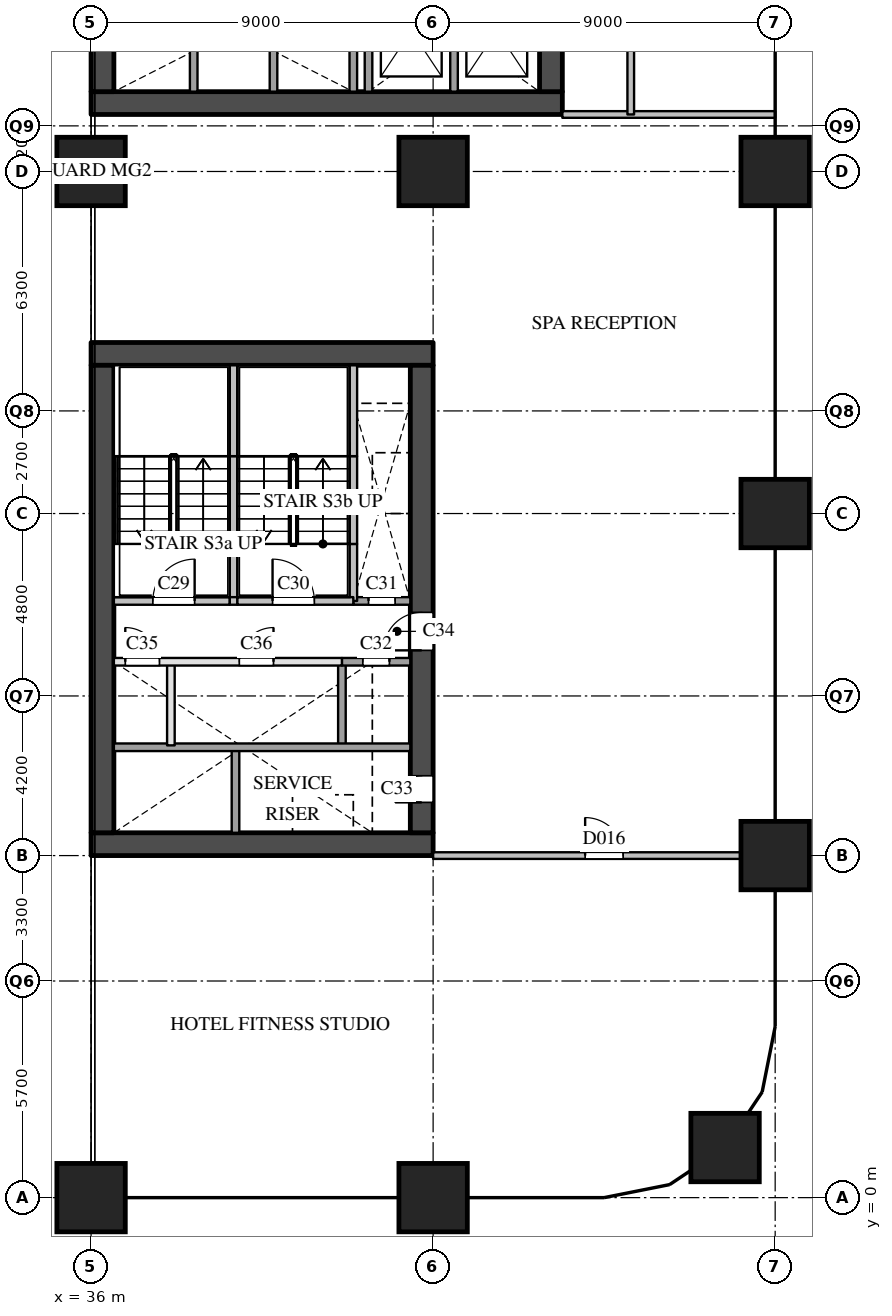
"""IFC4 building model, lengths in metres.
Left out: names, types, materials, properties, quantities, classifications, styles, units other than length and angle.
Written with IfcOpenShell. Run it as: python <this file> out.ifc"""

import sys

from ifc_helpers import new_model, si_unit, direction, frame, frame_2d, origin, origin_2d, place, context, subcontext, project, spatial, rectangle, extrude, element, fill, save


model = new_model("IFC4")
c1 = context("Model", 3, precision=1e-05, world=origin(), true_north=direction((0.0, 1.0)))
c2 = subcontext(c1, "Body", "Model", "MODEL_VIEW")
j1 = project(units=[si_unit("LENGTHUNIT", "METRE"), si_unit("PLANEANGLEUNIT", "RADIAN")], contexts=[c1])
p1 = place(None, origin())
s1 = spatial("IfcSite", under=j1, at=p1, CompositionType="ELEMENT")
p2 = place(p1, origin())
s2 = spatial("IfcBuilding", under=s1, at=p2, CompositionType="ELEMENT")
p3 = place(p2, frame((0.0, 0.0, 21.0)))
s3 = spatial("IfcBuildingStorey", under=s2, at=p3, CompositionType="ELEMENT", Elevation=21.0)
for number, where, z_axis, x_axis in (
    (1, (36.0, 0.0, 0.0), (0.0, 0.0, 1.0), (1.0, 0.0, 0.0)),
    (2, (36.0, 27.0, 0.0), (0.0, 0.0, 1.0), (1.0, 0.0, 0.0)),
    (3, (45.0, 0.0, 0.0), (0.0, 0.0, 1.0), (1.0, 0.0, 0.0)),
    (4, (45.0, 27.0, 0.0), (0.0, 0.0, 1.0), (1.0, 0.0, 0.0)),
    (5, (52.682, 1.318, 0.0), (0.0, 0.0, 1.0), (1.0, 0.0, 0.0)),
    (6, (54.0, 9.0, 0.0), (0.0, 0.0, 1.0), (1.0, 0.0, 0.0)),
    (7, (54.0, 18.0, 0.0), (0.0, 0.0, 1.0), (1.0, 0.0, 0.0)),
    (8, (54.0, 27.0, 0.0), (0.0, 0.0, 1.0), (1.0, 0.0, 0.0)),
):
    element("IfcColumn", number, at=place(p3, frame(where, z_axis=z_axis, x_axis=x_axis)), inside=s3, PredefinedType="COLUMN", context=c2, shape_type="SweptSolid", body=[
        extrude(rectangle(XDim=1.8, YDim=1.8, at=origin_2d()), origin(), (0.0, 0.0, 1.0), 5.0),
    ])
p4 = place(p3, frame((36.0, 28.8, 0.0), z_axis=(0.0, 0.0, 1.0), x_axis=(1.0, 0.0, 0.0)))
e9 = element("IfcWall", 9, at=p4, inside=s3, PredefinedType="SHEAR", context=c2, shape_type="SweptSolid", body=[
    extrude(rectangle(XDim=12.4, YDim=0.6, at=frame_2d((6.2, 0.0))), origin(), (0.0, 0.0, 1.0), 4.55),
])
p5 = place(p3, frame((36.3, 29.1, 0.0), z_axis=(0.0, 0.0, 1.0), x_axis=(0.0, 1.0, 0.0)))
e10 = element("IfcWall", 10, at=p5, inside=s3, PredefinedType="SHEAR", context=c2, shape_type="SweptSolid", body=[
    extrude(rectangle(XDim=20.3, YDim=0.6, at=frame_2d((10.15, 0.0))), origin(), (0.0, 0.0, 1.0), 4.55),
])
p6 = place(p3, frame((48.1, 29.1, 0.0), z_axis=(0.0, 0.0, 1.0), x_axis=(0.0, 1.0, 0.0)))
e11 = element("IfcWall", 11, at=p6, inside=s3, PredefinedType="SHEAR", context=c2, shape_type="SweptSolid", body=[
    extrude(rectangle(XDim=20.3, YDim=0.6, at=frame_2d((10.15, 0.0))), origin(), (0.0, 0.0, 1.0), 4.55),
])
p7 = place(p6, frame((12.5, 0.0, 0.0)))
e12 = element("IfcOpeningElement", 12, at=p7, cuts=e11, PredefinedType="OPENING", context=c2, shape_type="SweptSolid", body=[
    extrude(rectangle(XDim=0.7, YDim=2.1, at=frame_2d((0.35, 1.05))), frame((0.0, 0.31, 0.0), z_axis=(0.0, -1.0, 0.0), x_axis=(1.0, 0.0, 0.0)), (0.0, 0.0, 1.0), 0.62),
])
p8 = place(p6, frame((3.9, 0.0, 0.0)))
e13 = element("IfcOpeningElement", 13, at=p8, cuts=e11, PredefinedType="OPENING", context=c2, shape_type="SweptSolid", body=[
    extrude(rectangle(XDim=1.8, YDim=2.1, at=frame_2d((0.9, 1.05))), frame((0.0, 0.31, 0.0), z_axis=(0.0, -1.0, 0.0), x_axis=(1.0, 0.0, 0.0)), (0.0, 0.0, 1.0), 0.62),
])
p9 = place(p6, frame((16.4, 0.0, 0.0)))
e14 = element("IfcOpeningElement", 14, at=p9, cuts=e11, PredefinedType="OPENING", context=c2, shape_type="SweptSolid", body=[
    extrude(rectangle(XDim=1.0, YDim=2.1, at=frame_2d((0.5, 1.05))), frame((0.0, 0.31, 0.0), z_axis=(0.0, -1.0, 0.0), x_axis=(1.0, 0.0, 0.0)), (0.0, 0.0, 1.0), 0.62),
])
for number, where, z_axis, x_axis in (
    (15, (38.7, 29.1, 0.0), (0.0, 0.0, 1.0), (0.0, 1.0, 0.0)),
    (16, (40.8, 29.1, 0.0), (0.0, 0.0, 1.0), (0.0, 1.0, 0.0)),
    (17, (42.9, 29.1, 0.0), (0.0, 0.0, 1.0), (0.0, 1.0, 0.0)),
):
    element("IfcWall", number, at=place(p3, frame(where, z_axis=z_axis, x_axis=x_axis)), inside=s3, PredefinedType="SOLIDWALL", context=c2, shape_type="SweptSolid", body=[
        extrude(rectangle(XDim=3.2, YDim=0.2, at=frame_2d((1.6, 0.0))), origin(), (0.0, 0.0, 1.0), 4.55),
    ])
p10 = place(p3, frame((43.3, 29.1, 0.0), z_axis=(0.0, 0.0, 1.0), x_axis=(0.0, 1.0, 0.0)))
e18 = element("IfcWall", 18, at=p10, inside=s3, PredefinedType="SOLIDWALL", context=c2, shape_type="SweptSolid", body=[
    extrude(rectangle(XDim=9.9, YDim=0.2, at=frame_2d((4.95, 0.0))), origin(), (0.0, 0.0, 1.0), 4.55),
])
p11 = place(p10, frame((3.6, 0.0, 0.0)))
e19 = element("IfcOpeningElement", 19, at=p11, cuts=e18, PredefinedType="OPENING", context=c2, shape_type="SweptSolid", body=[
    extrude(rectangle(XDim=1.8, YDim=2.1, at=frame_2d((0.9, 1.05))), frame((0.0, 0.11, 0.0), z_axis=(0.0, -1.0, 0.0), x_axis=(1.0, 0.0, 0.0)), (0.0, 0.0, 1.0), 0.22),
])
p12 = place(p3, frame((45.55, 29.1, 0.0), z_axis=(0.0, 0.0, 1.0), x_axis=(0.0, 1.0, 0.0)))
e20 = element("IfcWall", 20, at=p12, inside=s3, PredefinedType="SOLIDWALL", context=c2, shape_type="SweptSolid", body=[
    extrude(rectangle(XDim=3.2, YDim=0.2, at=frame_2d((1.6, 0.0))), origin(), (0.0, 0.0, 1.0), 4.55),
])
for number, where, z_axis, x_axis in (
    (21, (36.0, 9.3, 0.0), (0.0, 0.0, 1.0), (1.0, 0.0, 0.0)),
    (22, (36.0, 22.2, 0.0), (0.0, 0.0, 1.0), (1.0, 0.0, 0.0)),
):
    element("IfcWall", number, at=place(p3, frame(where, z_axis=z_axis, x_axis=x_axis)), inside=s3, PredefinedType="SHEAR", context=c2, shape_type="SweptSolid", body=[
        extrude(rectangle(XDim=9.0, YDim=0.6, at=frame_2d((4.5, 0.0))), origin(), (0.0, 0.0, 1.0), 4.55),
    ])
p13 = place(p3, frame((36.3, 9.6, 0.0), z_axis=(0.0, 0.0, 1.0), x_axis=(0.0, 1.0, 0.0)))
e23 = element("IfcWall", 23, at=p13, inside=s3, PredefinedType="SHEAR", context=c2, shape_type="SweptSolid", body=[
    extrude(rectangle(XDim=12.3, YDim=0.6, at=frame_2d((6.15, 0.0))), origin(), (0.0, 0.0, 1.0), 4.55),
])
p14 = place(p3, frame((44.7, 9.6, 0.0), z_axis=(0.0, 0.0, 1.0), x_axis=(0.0, 1.0, 0.0)))
e24 = element("IfcWall", 24, at=p14, inside=s3, PredefinedType="SHEAR", context=c2, shape_type="SweptSolid", body=[
    extrude(rectangle(XDim=12.3, YDim=0.6, at=frame_2d((6.15, 0.0))), origin(), (0.0, 0.0, 1.0), 4.55),
])
p15 = place(p14, frame((0.8, 0.0, 0.0)))
e25 = element("IfcOpeningElement", 25, at=p15, cuts=e24, PredefinedType="OPENING", context=c2, shape_type="SweptSolid", body=[
    extrude(rectangle(XDim=0.7, YDim=2.1, at=frame_2d((0.35, 1.05))), frame((0.0, 0.31, 0.0), z_axis=(0.0, -1.0, 0.0), x_axis=(1.0, 0.0, 0.0)), (0.0, 0.0, 1.0), 0.62),
])
p16 = place(p14, frame((4.8, 0.0, 0.0)))
e26 = element("IfcOpeningElement", 26, at=p16, cuts=e24, PredefinedType="OPENING", context=c2, shape_type="SweptSolid", body=[
    extrude(rectangle(XDim=1.0, YDim=2.1, at=frame_2d((0.5, 1.05))), frame((0.0, 0.31, 0.0), z_axis=(0.0, -1.0, 0.0), x_axis=(1.0, 0.0, 0.0)), (0.0, 0.0, 1.0), 0.62),
])
p17 = place(p3, frame((38.1, 11.9, 0.0), z_axis=(0.0, 0.0, 1.0), x_axis=(0.0, 1.0, 0.0)))
e27 = element("IfcWall", 27, at=p17, inside=s3, PredefinedType="PARTITIONING", context=c2, shape_type="SweptSolid", body=[
    extrude(rectangle(XDim=2.2, YDim=0.2, at=frame_2d((1.1, 0.0))), origin(), (0.0, 0.0, 1.0), 4.55),
])
p18 = place(p3, frame((39.75, 15.7, 0.0), z_axis=(0.0, 0.0, 1.0), x_axis=(0.0, 1.0, 0.0)))
e28 = element("IfcWall", 28, at=p18, inside=s3, PredefinedType="SOLIDWALL", context=c2, shape_type="SweptSolid", body=[
    extrude(rectangle(XDim=1.5, YDim=0.2, at=frame_2d((0.75, 0.0))), origin(), (0.0, 0.0, 1.0), 4.55),
])
p19 = place(p3, frame((39.75, 17.2, 0.0), z_axis=(0.0, 0.0, 1.0), x_axis=(0.0, 1.0, 0.0)))
e29 = element("IfcWall", 29, at=p19, inside=s3, PredefinedType="SOLIDWALL", context=c2, shape_type="SweptSolid", body=[
    extrude(rectangle(XDim=2.31, YDim=0.2, at=frame_2d((1.155, 0.0))), origin(), (0.0, 0.0, 1.0), 4.55),
])
p20 = place(p3, frame((39.75, 19.51, 0.0), z_axis=(0.0, 0.0, 1.0), x_axis=(0.0, 1.0, 0.0)))
e30 = element("IfcWall", 30, at=p20, inside=s3, PredefinedType="SOLIDWALL", context=c2, shape_type="SweptSolid", body=[
    extrude(rectangle(XDim=2.39, YDim=0.2, at=frame_2d((1.195, 0.0))), origin(), (0.0, 0.0, 1.0), 4.55),
])
p21 = place(p3, frame((39.8, 9.6, 0.0), z_axis=(0.0, 0.0, 1.0), x_axis=(0.0, 1.0, 0.0)))
e31 = element("IfcWall", 31, at=p21, inside=s3, PredefinedType="SOLIDWALL", context=c2, shape_type="SweptSolid", body=[
    extrude(rectangle(XDim=2.3, YDim=0.2, at=frame_2d((1.15, 0.0))), origin(), (0.0, 0.0, 1.0), 4.55),
])
p22 = place(p3, frame((42.6, 11.9, 0.0), z_axis=(0.0, 0.0, 1.0), x_axis=(0.0, 1.0, 0.0)))
e32 = element("IfcWall", 32, at=p22, inside=s3, PredefinedType="SOLIDWALL", context=c2, shape_type="SweptSolid", body=[
    extrude(rectangle(XDim=2.2, YDim=0.2, at=frame_2d((1.1, 0.0))), origin(), (0.0, 0.0, 1.0), 4.55),
])
p23 = place(p3, frame((42.9, 15.7, 0.0), z_axis=(0.0, 0.0, 1.0), x_axis=(0.0, 1.0, 0.0)))
e33 = element("IfcWall", 33, at=p23, inside=s3, PredefinedType="SOLIDWALL", context=c2, shape_type="SweptSolid", body=[
    extrude(rectangle(XDim=1.5, YDim=0.2, at=frame_2d((0.75, 0.0))), origin(), (0.0, 0.0, 1.0), 4.55),
])
p24 = place(p3, frame((42.9, 17.2, 0.0), z_axis=(0.0, 0.0, 1.0), x_axis=(0.0, 1.0, 0.0)))
e34 = element("IfcWall", 34, at=p24, inside=s3, PredefinedType="SOLIDWALL", context=c2, shape_type="SweptSolid", body=[
    extrude(rectangle(XDim=2.31, YDim=0.2, at=frame_2d((1.155, 0.0))), origin(), (0.0, 0.0, 1.0), 4.55),
])
p25 = place(p3, frame((42.9, 19.51, 0.0), z_axis=(0.0, 0.0, 1.0), x_axis=(0.0, 1.0, 0.0)))
e35 = element("IfcWall", 35, at=p25, inside=s3, PredefinedType="SOLIDWALL", context=c2, shape_type="SweptSolid", body=[
    extrude(rectangle(XDim=2.39, YDim=0.2, at=frame_2d((1.195, 0.0))), origin(), (0.0, 0.0, 1.0), 4.55),
])
p26 = place(p3, frame((36.6, 11.85, 0.0), z_axis=(0.0, 0.0, 1.0), x_axis=(1.0, 0.0, 0.0)))
e36 = element("IfcWall", 36, at=p26, inside=s3, PredefinedType="SOLIDWALL", context=c2, shape_type="SweptSolid", body=[
    extrude(rectangle(XDim=7.8, YDim=0.2, at=frame_2d((3.9, 0.0))), origin(), (0.0, 0.0, 1.0), 4.55),
])
p27 = place(p3, frame((36.6, 14.1, 0.0), z_axis=(0.0, 0.0, 1.0), x_axis=(1.0, 0.0, 0.0)))
e37 = element("IfcWall", 37, at=p27, inside=s3, PredefinedType="PARTITIONING", context=c2, shape_type="SweptSolid", body=[
    extrude(rectangle(XDim=6.0, YDim=0.2, at=frame_2d((3.0, 0.0))), origin(), (0.0, 0.0, 1.0), 4.55),
])
p28 = place(p27, frame((0.3, 0.0, 0.0)))
e38 = element("IfcOpeningElement", 38, at=p28, cuts=e37, PredefinedType="OPENING", context=c2, shape_type="SweptSolid", body=[
    extrude(rectangle(XDim=0.9, YDim=2.1, at=frame_2d((0.45, 1.05))), frame((0.0, 0.11, 0.0), z_axis=(0.0, -1.0, 0.0), x_axis=(1.0, 0.0, 0.0)), (0.0, 0.0, 1.0), 0.22),
])
p29 = place(p27, frame((3.3, 0.0, 0.0)))
e39 = element("IfcOpeningElement", 39, at=p29, cuts=e37, PredefinedType="OPENING", context=c2, shape_type="SweptSolid", body=[
    extrude(rectangle(XDim=0.9, YDim=2.1, at=frame_2d((0.45, 1.05))), frame((0.0, 0.11, 0.0), z_axis=(0.0, -1.0, 0.0), x_axis=(1.0, 0.0, 0.0)), (0.0, 0.0, 1.0), 0.22),
])
p30 = place(p3, frame((42.6, 14.1, 0.0), z_axis=(0.0, 0.0, 1.0), x_axis=(1.0, 0.0, 0.0)))
e40 = element("IfcWall", 40, at=p30, inside=s3, PredefinedType="SOLIDWALL", context=c2, shape_type="SweptSolid", body=[
    extrude(rectangle(XDim=1.8, YDim=0.2, at=frame_2d((0.9, 0.0))), origin(), (0.0, 0.0, 1.0), 4.55),
])
p31 = place(p30, frame((0.55, 0.0, 0.0)))
e41 = element("IfcOpeningElement", 41, at=p31, cuts=e40, PredefinedType="OPENING", context=c2, shape_type="SweptSolid", body=[
    extrude(rectangle(XDim=0.7, YDim=2.1, at=frame_2d((0.35, 1.05))), frame((0.0, 0.11, 0.0), z_axis=(0.0, -1.0, 0.0), x_axis=(1.0, 0.0, 0.0)), (0.0, 0.0, 1.0), 0.22),
])
p32 = place(p3, frame((42.9, 15.7, 0.0), z_axis=(0.0, 0.0, 1.0), x_axis=(1.0, 0.0, 0.0)))
e42 = element("IfcWall", 42, at=p32, inside=s3, PredefinedType="SOLIDWALL", context=c2, shape_type="SweptSolid", body=[
    extrude(rectangle(XDim=1.5, YDim=0.2, at=frame_2d((0.75, 0.0))), origin(), (0.0, 0.0, 1.0), 4.55),
])
p33 = place(p32, frame((0.4, 0.0, 0.0)))
e43 = element("IfcOpeningElement", 43, at=p33, cuts=e42, PredefinedType="OPENING", context=c2, shape_type="SweptSolid", body=[
    extrude(rectangle(XDim=0.7, YDim=2.1, at=frame_2d((0.35, 1.05))), frame((0.0, 0.11, 0.0), z_axis=(0.0, -1.0, 0.0), x_axis=(1.0, 0.0, 0.0)), (0.0, 0.0, 1.0), 0.22),
])
p34 = place(p3, frame((36.6, 15.7, 0.0), z_axis=(0.0, 0.0, 1.0), x_axis=(1.0, 0.0, 0.0)))
e44 = element("IfcWall", 44, at=p34, inside=s3, PredefinedType="SOLIDWALL", context=c2, shape_type="SweptSolid", body=[
    extrude(rectangle(XDim=3.05, YDim=0.2, at=frame_2d((1.525, 0.0))), origin(), (0.0, 0.0, 1.0), 4.55),
])
p35 = place(p34, frame((1.025, 0.0, 0.0)))
e45 = element("IfcOpeningElement", 45, at=p35, cuts=e44, PredefinedType="OPENING", context=c2, shape_type="SweptSolid", body=[
    extrude(rectangle(XDim=1.1, YDim=2.1, at=frame_2d((0.55, 1.05))), frame((0.0, 0.11, 0.0), z_axis=(0.0, -1.0, 0.0), x_axis=(1.0, 0.0, 0.0)), (0.0, 0.0, 1.0), 0.22),
])
p36 = place(p3, frame((39.65, 15.7, 0.0), z_axis=(0.0, 0.0, 1.0), x_axis=(1.0, 0.0, 0.0)))
e46 = element("IfcWall", 46, at=p36, inside=s3, PredefinedType="SOLIDWALL", context=c2, shape_type="SweptSolid", body=[
    extrude(rectangle(XDim=0.2, YDim=0.2, at=frame_2d((0.1, 0.0))), origin(), (0.0, 0.0, 1.0), 4.55),
])
p37 = place(p3, frame((39.85, 15.7, 0.0), z_axis=(0.0, 0.0, 1.0), x_axis=(1.0, 0.0, 0.0)))
e47 = element("IfcWall", 47, at=p37, inside=s3, PredefinedType="SOLIDWALL", context=c2, shape_type="SweptSolid", body=[
    extrude(rectangle(XDim=3.05, YDim=0.2, at=frame_2d((1.525, 0.0))), origin(), (0.0, 0.0, 1.0), 4.55),
])
p38 = place(p37, frame((0.925, 0.0, 0.0)))
e48 = element("IfcOpeningElement", 48, at=p38, cuts=e47, PredefinedType="OPENING", context=c2, shape_type="SweptSolid", body=[
    extrude(rectangle(XDim=1.1, YDim=2.1, at=frame_2d((0.55, 1.05))), frame((0.0, 0.11, 0.0), z_axis=(0.0, -1.0, 0.0), x_axis=(1.0, 0.0, 0.0)), (0.0, 0.0, 1.0), 0.22),
])
p39 = place(p3, frame((45.0, 9.0, 0.0), z_axis=(0.0, 0.0, 1.0), x_axis=(1.0, 0.0, 0.0)))
e49 = element("IfcWall", 49, at=p39, inside=s3, PredefinedType="PARTITIONING", context=c2, shape_type="SweptSolid", body=[
    extrude(rectangle(XDim=9.0, YDim=0.175, at=frame_2d((4.5, 0.0))), origin(), (0.0, 0.0, 1.0), 4.55),
])
p40 = place(p39, frame((4.0, 0.0, 0.0)))
e50 = element("IfcOpeningElement", 50, at=p40, cuts=e49, PredefinedType="OPENING", context=c2, shape_type="SweptSolid", body=[
    extrude(rectangle(XDim=1.0, YDim=2.1, at=frame_2d((0.5, 1.05))), frame((0.0, 0.097, 0.0), z_axis=(0.0, -1.0, 0.0), x_axis=(1.0, 0.0, 0.0)), (0.0, 0.0, 1.0), 0.195),
])
p41 = place(p3, frame((48.4, 28.5, 0.0), z_axis=(0.0, 0.0, 1.0), x_axis=(1.0, 0.0, 0.0)))
e51 = element("IfcWall", 51, at=p41, inside=s3, PredefinedType="PARTITIONING", context=c2, shape_type="SweptSolid", body=[
    extrude(rectangle(XDim=5.6, YDim=0.175, at=frame_2d((2.8, 0.0))), origin(), (0.0, 0.0, 1.0), 3.55),
])
p42 = place(p3, frame((50.2, 28.5, 0.0), z_axis=(0.0, 0.0, 1.0), x_axis=(0.0, 1.0, 0.0)))
e52 = element("IfcWall", 52, at=p42, inside=s3, PredefinedType="PARTITIONING", context=c2, shape_type="SweptSolid", body=[
    extrude(rectangle(XDim=21.5, YDim=0.175, at=frame_2d((10.75, 0.0))), origin(), (0.0, 0.0, 1.0), 4.55),
])
p43 = place(p42, frame((5.25, 0.0, 0.0)))
e53 = element("IfcOpeningElement", 53, at=p43, cuts=e52, PredefinedType="OPENING", context=c2, shape_type="SweptSolid", body=[
    extrude(rectangle(XDim=1.0, YDim=2.1, at=frame_2d((0.5, 1.05))), frame((0.0, 0.097, 0.0), z_axis=(0.0, -1.0, 0.0), x_axis=(1.0, 0.0, 0.0)), (0.0, 0.0, 1.0), 0.195),
])
p44 = place(p42, frame((16.0, 0.0, 0.0)))
e54 = element("IfcOpeningElement", 54, at=p44, cuts=e52, PredefinedType="OPENING", context=c2, shape_type="SweptSolid", body=[
    extrude(rectangle(XDim=1.0, YDim=2.1, at=frame_2d((0.5, 1.05))), frame((0.0, 0.097, 0.0), z_axis=(0.0, -1.0, 0.0), x_axis=(1.0, 0.0, 0.0)), (0.0, 0.0, 1.0), 0.195),
])
p45 = place(p35, origin())
e55 = element("IfcDoor", 55, at=p45, inside=s3, OperationType="SINGLE_SWING_RIGHT", PredefinedType="DOOR", context=c2, shape_type="SweptSolid", body=[
    extrude(rectangle(XDim=1.1, YDim=2.1, at=frame_2d((0.55, 1.05))), frame((0.0, 0.025, 0.0), z_axis=(0.0, -1.0, 0.0), x_axis=(1.0, 0.0, 0.0)), (0.0, 0.0, 1.0), 0.05),
])
fill(e45, e55)
p46 = place(p38, origin())
e56 = element("IfcDoor", 56, at=p46, inside=s3, OperationType="SINGLE_SWING_LEFT", PredefinedType="DOOR", context=c2, shape_type="SweptSolid", body=[
    extrude(rectangle(XDim=1.1, YDim=2.1, at=frame_2d((0.55, 1.05))), frame((0.0, 0.025, 0.0), z_axis=(0.0, -1.0, 0.0), x_axis=(1.0, 0.0, 0.0)), (0.0, 0.0, 1.0), 0.05),
])
fill(e48, e56)
p47 = place(p33, origin())
e57 = element("IfcDoor", 57, at=p47, inside=s3, OperationType="SINGLE_SWING_LEFT", PredefinedType="DOOR", context=c2, shape_type="SweptSolid", body=[
    extrude(rectangle(XDim=0.7, YDim=2.1, at=frame_2d((0.35, 1.05))), frame((0.0, 0.025, 0.0), z_axis=(0.0, -1.0, 0.0), x_axis=(1.0, 0.0, 0.0)), (0.0, 0.0, 1.0), 0.05),
])
fill(e43, e57)
p48 = place(p31, origin())
e58 = element("IfcDoor", 58, at=p48, inside=s3, OperationType="SINGLE_SWING_RIGHT", PredefinedType="DOOR", context=c2, shape_type="SweptSolid", body=[
    extrude(rectangle(XDim=0.7, YDim=2.1, at=frame_2d((0.35, 1.05))), frame((0.0, 0.025, 0.0), z_axis=(0.0, -1.0, 0.0), x_axis=(1.0, 0.0, 0.0)), (0.0, 0.0, 1.0), 0.05),
])
fill(e41, e58)
p49 = place(p15, origin())
e59 = element("IfcDoor", 59, at=p49, inside=s3, OperationType="SINGLE_SWING_LEFT", PredefinedType="DOOR", context=c2, shape_type="SweptSolid", body=[
    extrude(rectangle(XDim=0.7, YDim=2.1, at=frame_2d((0.35, 1.05))), frame((0.0, 0.025, 0.0), z_axis=(0.0, -1.0, 0.0), x_axis=(1.0, 0.0, 0.0)), (0.0, 0.0, 1.0), 0.05),
])
fill(e25, e59)
p50 = place(p16, origin())
e60 = element("IfcDoor", 60, at=p50, inside=s3, OperationType="SINGLE_SWING_LEFT", PredefinedType="DOOR", context=c2, shape_type="SweptSolid", body=[
    extrude(rectangle(XDim=1.0, YDim=2.1, at=frame_2d((0.5, 1.05))), frame((0.0, 0.025, 0.0), z_axis=(0.0, -1.0, 0.0), x_axis=(1.0, 0.0, 0.0)), (0.0, 0.0, 1.0), 0.05),
])
fill(e26, e60)
p51 = place(p28, origin())
e61 = element("IfcDoor", 61, at=p51, inside=s3, OperationType="SINGLE_SWING_LEFT", PredefinedType="DOOR", context=c2, shape_type="SweptSolid", body=[
    extrude(rectangle(XDim=0.9, YDim=2.1, at=frame_2d((0.45, 1.05))), frame((0.0, 0.025, 0.0), z_axis=(0.0, -1.0, 0.0), x_axis=(1.0, 0.0, 0.0)), (0.0, 0.0, 1.0), 0.05),
])
fill(e38, e61)
p52 = place(p29, origin())
e62 = element("IfcDoor", 62, at=p52, inside=s3, OperationType="SINGLE_SWING_RIGHT", PredefinedType="DOOR", context=c2, shape_type="SweptSolid", body=[
    extrude(rectangle(XDim=0.9, YDim=2.1, at=frame_2d((0.45, 1.05))), frame((0.0, 0.025, 0.0), z_axis=(0.0, -1.0, 0.0), x_axis=(1.0, 0.0, 0.0)), (0.0, 0.0, 1.0), 0.05),
])
fill(e39, e62)
p53 = place(p40, origin())
e63 = element("IfcDoor", 63, at=p53, inside=s3, OperationType="SINGLE_SWING_LEFT", PredefinedType="DOOR", context=c2, shape_type="SweptSolid", body=[
    extrude(rectangle(XDim=1.0, YDim=2.1, at=frame_2d((0.5, 1.05))), frame((0.0, 0.025, 0.0), z_axis=(0.0, -1.0, 0.0), x_axis=(1.0, 0.0, 0.0)), (0.0, 0.0, 1.0), 0.05),
])
fill(e50, e63)
save(model, sys.argv[1])
